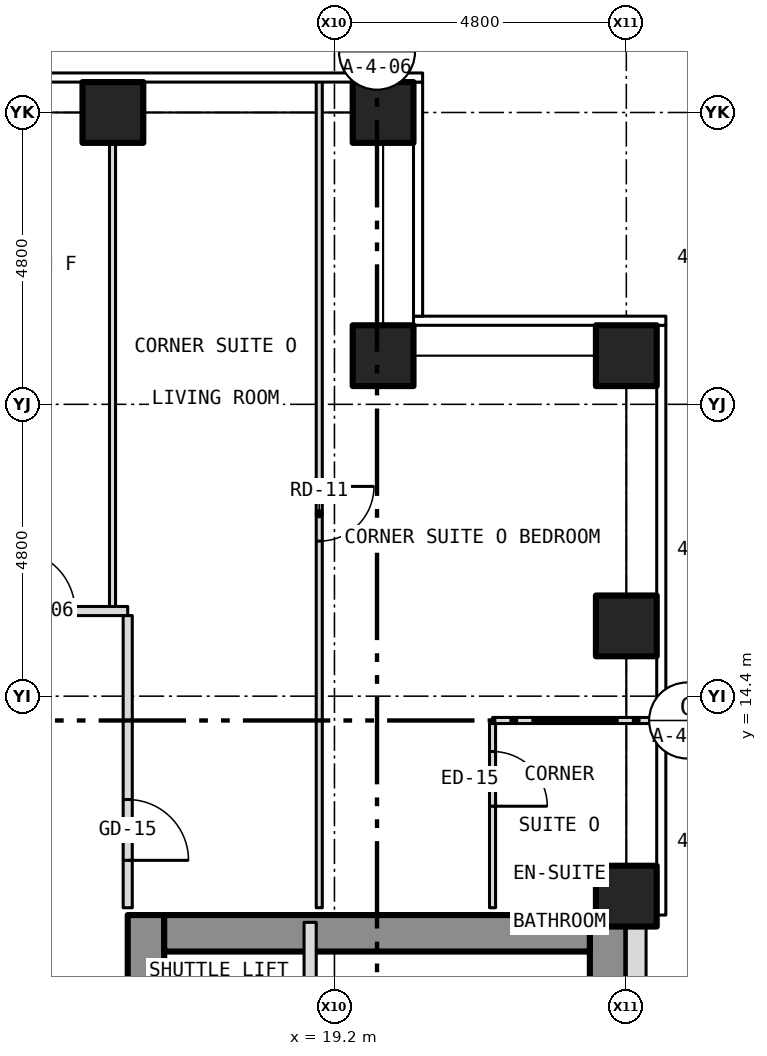
"""IFC4 building model, lengths in metres.
Left out: names, types, materials, properties, quantities, classifications, styles, units other than length and angle.
Written with IfcOpenShell. Run it as: python <this file> out.ifc"""

import sys

from ifc_helpers import new_model, si_unit, direction, frame, frame_2d, origin, origin_2d, place, context, subcontext, project, spatial, rectangle, hollow_rectangle, extrude, element, fill, save


model = new_model("IFC4")
c1 = context("Model", 3, precision=1e-05, world=origin(), true_north=direction((0.0, 1.0)))
c2 = subcontext(c1, "Body", "Model", "MODEL_VIEW")
j1 = project(units=[si_unit("LENGTHUNIT", "METRE"), si_unit("PLANEANGLEUNIT", "RADIAN")], contexts=[c1])
p1 = place(None, origin())
s1 = spatial("IfcSite", under=j1, at=p1, CompositionType="ELEMENT")
p2 = place(p1, origin())
s2 = spatial("IfcBuilding", under=s1, at=p2, CompositionType="ELEMENT")
p3 = place(p2, frame((0.0, 0.0, 53.0)))
s3 = spatial("IfcBuildingStorey", under=s2, at=p3, CompositionType="ELEMENT", Elevation=53.0)
for number, where, z_axis, x_axis in (
    (1, (15.556, 24.0, -0.15), (0.0, 0.0, 1.0), (1.0, 0.0, 0.0)),
    (2, (20.0, 24.0, -0.15), (0.0, 0.0, 1.0), (1.0, 0.0, 0.0)),
    (3, (24.0, 11.111, -0.15), (0.0, 0.0, 1.0), (1.0, 0.0, 0.0)),
    (4, (24.0, 15.556, -0.15), (0.0, 0.0, 1.0), (1.0, 0.0, 0.0)),
    (5, (24.0, 20.0, -0.15), (0.0, 0.0, 1.0), (1.0, 0.0, 0.0)),
    (6, (20.0, 20.0, -0.15), (0.0, 0.0, 1.0), (1.0, 0.0, 0.0)),
):
    element("IfcColumn", number, at=place(p3, frame(where, z_axis=z_axis, x_axis=x_axis)), inside=s3, PredefinedType="COLUMN", context=c2, shape_type="SweptSolid", body=[
        extrude(hollow_rectangle(XDim=1.0, YDim=1.0, WallThickness=0.06, at=origin_2d()), origin(), (0.0, 0.0, 1.0), 3.5),
    ])
p4 = place(p3, frame((16.1, -10.8, 0.0), z_axis=(0.0, 0.0, 1.0), x_axis=(0.0, 1.0, 0.0)))
e7 = element("IfcWall", 7, at=p4, inside=s3, PredefinedType="SHEAR", context=c2, shape_type="SweptSolid", body=[
    extrude(rectangle(XDim=21.6, YDim=0.6, at=frame_2d((10.8, 0.0))), origin(), (0.0, 0.0, 1.0), 3.25),
])
p5 = place(p4, frame((9.4, 0.0, 0.0)))
e8 = element("IfcOpeningElement", 8, at=p5, cuts=e7, PredefinedType="OPENING", context=c2, shape_type="SweptSolid", body=[
    extrude(rectangle(XDim=1.1, YDim=2.1, at=frame_2d((0.55, 1.05))), frame((0.0, 0.312, 0.0), z_axis=(0.0, -1.0, 0.0), x_axis=(1.0, 0.0, 0.0)), (0.0, 0.0, 1.0), 0.624),
])
p6 = place(p4, frame((11.5, 0.0, 0.0)))
e9 = element("IfcOpeningElement", 9, at=p6, cuts=e7, PredefinedType="OPENING", context=c2, shape_type="SweptSolid", body=[
    extrude(rectangle(XDim=1.1, YDim=2.1, at=frame_2d((0.55, 1.05))), frame((0.0, 0.312, 0.0), z_axis=(0.0, -1.0, 0.0), x_axis=(1.0, 0.0, 0.0)), (0.0, 0.0, 1.0), 0.624),
])
p7 = place(p4, frame((13.6, 0.0, 0.0)))
e10 = element("IfcOpeningElement", 10, at=p7, cuts=e7, PredefinedType="OPENING", context=c2, shape_type="SweptSolid", body=[
    extrude(rectangle(XDim=1.1, YDim=2.1, at=frame_2d((0.55, 1.05))), frame((0.0, 0.312, 0.0), z_axis=(0.0, -1.0, 0.0), x_axis=(1.0, 0.0, 0.0)), (0.0, 0.0, 1.0), 0.624),
])
p8 = place(p4, frame((15.7, 0.0, 0.0)))
e11 = element("IfcOpeningElement", 11, at=p8, cuts=e7, PredefinedType="OPENING", context=c2, shape_type="SweptSolid", body=[
    extrude(rectangle(XDim=1.1, YDim=2.1, at=frame_2d((0.55, 1.05))), frame((0.0, 0.312, 0.0), z_axis=(0.0, -1.0, 0.0), x_axis=(1.0, 0.0, 0.0)), (0.0, 0.0, 1.0), 0.624),
])
p9 = place(p4, frame((17.8, 0.0, 0.0)))
e12 = element("IfcOpeningElement", 12, at=p9, cuts=e7, PredefinedType="OPENING", context=c2, shape_type="SweptSolid", body=[
    extrude(rectangle(XDim=1.1, YDim=2.1, at=frame_2d((0.55, 1.05))), frame((0.0, 0.312, 0.0), z_axis=(0.0, -1.0, 0.0), x_axis=(1.0, 0.0, 0.0)), (0.0, 0.0, 1.0), 0.624),
])
p10 = place(p4, frame((5.642, 0.0, 0.0)))
e13 = element("IfcOpeningElement", 13, at=p10, cuts=e7, PredefinedType="OPENING", context=c2, shape_type="SweptSolid", body=[
    extrude(rectangle(XDim=1.1, YDim=2.1, at=frame_2d((0.55, 1.05))), frame((0.0, 0.312, 0.0), z_axis=(0.0, -1.0, 0.0), x_axis=(1.0, 0.0, 0.0)), (0.0, 0.0, 1.0), 0.624),
])
p11 = place(p4, frame((7.5, 0.0, 0.0)))
e14 = element("IfcOpeningElement", 14, at=p11, cuts=e7, PredefinedType="OPENING", context=c2, shape_type="SweptSolid", body=[
    extrude(rectangle(XDim=1.1, YDim=2.1, at=frame_2d((0.55, 1.05))), frame((0.0, 0.312, 0.0), z_axis=(0.0, -1.0, 0.0), x_axis=(1.0, 0.0, 0.0)), (0.0, 0.0, 1.0), 0.624),
])
p12 = place(p3, frame((23.7, -10.8, 0.0), z_axis=(0.0, 0.0, 1.0), x_axis=(0.0, 1.0, 0.0)))
e15 = element("IfcWall", 15, at=p12, inside=s3, PredefinedType="SHEAR", context=c2, shape_type="SweptSolid", body=[
    extrude(rectangle(XDim=21.6, YDim=0.6, at=frame_2d((10.8, 0.0))), origin(), (0.0, 0.0, 1.0), 3.25),
])
p13 = place(p3, frame((16.4, 10.5, 0.0), z_axis=(0.0, 0.0, 1.0), x_axis=(1.0, 0.0, 0.0)))
e16 = element("IfcWall", 16, at=p13, inside=s3, PredefinedType="SHEAR", context=c2, shape_type="SweptSolid", body=[
    extrude(rectangle(XDim=7.0, YDim=0.6, at=frame_2d((3.5, 0.0))), origin(), (0.0, 0.0, 1.0), 3.25),
])
p14 = place(p3, frame((24.163, -10.8, 0.0), z_axis=(0.0, 0.0, 1.0), x_axis=(0.0, 1.0, 0.0)))
e17 = element("IfcWall", 17, at=p14, inside=s3, PredefinedType="SOLIDWALL", context=c2, shape_type="SweptSolid", body=[
    extrude(rectangle(XDim=21.6, YDim=0.325, at=frame_2d((10.8, 0.0))), origin(), (0.0, 0.0, 1.0), 3.5),
])
p15 = place(p14, frame((2.95, 0.0, 1.0)))
e18 = element("IfcOpeningElement", 18, at=p15, cuts=e17, PredefinedType="OPENING", context=c2, shape_type="SweptSolid", body=[
    extrude(rectangle(XDim=0.6, YDim=1.5, at=frame_2d((0.3, 0.75))), frame((0.0, 0.175, 0.0), z_axis=(0.0, -1.0, 0.0), x_axis=(1.0, 0.0, 0.0)), (0.0, 0.0, 1.0), 0.349),
])
p16 = place(p3, frame((21.8, 14.0, 0.0), z_axis=(0.0, 0.0, 1.0), x_axis=(1.0, 0.0, 0.0)))
e19 = element("IfcWall", 19, at=p16, inside=s3, PredefinedType="PARTITIONING", context=c2, shape_type="SweptSolid", body=[
    extrude(rectangle(XDim=2.73, YDim=0.1, at=frame_2d((1.365, 0.0))), origin(), (0.0, 0.0, 1.0), 3.35),
])
p17 = place(p3, frame((-15.8, 15.8, 0.0), z_axis=(0.0, 0.0, 1.0), x_axis=(1.0, 0.0, 0.0)))
e20 = element("IfcWall", 20, at=p17, inside=s3, PredefinedType="PARTITIONING", context=c2, shape_type="SweptSolid", body=[
    extrude(rectangle(XDim=31.6, YDim=0.15, at=frame_2d((15.8, 0.0))), origin(), (0.0, 0.0, 1.0), 3.35),
])
p18 = place(p17, frame((4.178, 0.0, 0.0)))
e21 = element("IfcOpeningElement", 21, at=p18, cuts=e20, PredefinedType="OPENING", context=c2, shape_type="SweptSolid", body=[
    extrude(rectangle(XDim=1.0, YDim=2.1, at=frame_2d((0.5, 1.05))), frame((0.0, 0.087, 0.0), z_axis=(0.0, -1.0, 0.0), x_axis=(1.0, 0.0, 0.0)), (0.0, 0.0, 1.0), 0.174),
])
p19 = place(p17, frame((9.734, 0.0, 0.0)))
e22 = element("IfcOpeningElement", 22, at=p19, cuts=e20, PredefinedType="OPENING", context=c2, shape_type="SweptSolid", body=[
    extrude(rectangle(XDim=1.0, YDim=2.1, at=frame_2d((0.5, 1.05))), frame((0.0, 0.087, 0.0), z_axis=(0.0, -1.0, 0.0), x_axis=(1.0, 0.0, 0.0)), (0.0, 0.0, 1.0), 0.174),
])
p20 = place(p17, frame((14.178, 0.0, 0.0)))
e23 = element("IfcOpeningElement", 23, at=p20, cuts=e20, PredefinedType="OPENING", context=c2, shape_type="SweptSolid", body=[
    extrude(rectangle(XDim=1.0, YDim=2.1, at=frame_2d((0.5, 1.05))), frame((0.0, 0.087, 0.0), z_axis=(0.0, -1.0, 0.0), x_axis=(1.0, 0.0, 0.0)), (0.0, 0.0, 1.0), 0.174),
])
p21 = place(p17, frame((17.534, 0.0, 0.0)))
e24 = element("IfcOpeningElement", 24, at=p21, cuts=e20, PredefinedType="OPENING", context=c2, shape_type="SweptSolid", body=[
    extrude(rectangle(XDim=1.0, YDim=2.1, at=frame_2d((0.5, 1.05))), frame((0.0, 0.087, 0.0), z_axis=(0.0, -1.0, 0.0), x_axis=(1.0, 0.0, 0.0)), (0.0, 0.0, 1.0), 0.174),
])
p22 = place(p17, frame((25.289, 0.0, 0.0)))
e25 = element("IfcOpeningElement", 25, at=p22, cuts=e20, PredefinedType="OPENING", context=c2, shape_type="SweptSolid", body=[
    extrude(rectangle(XDim=1.0, YDim=2.1, at=frame_2d((0.5, 1.05))), frame((0.0, 0.087, 0.0), z_axis=(0.0, -1.0, 0.0), x_axis=(1.0, 0.0, 0.0)), (0.0, 0.0, 1.0), 0.174),
])
p23 = place(p17, frame((29.733, 0.0, 0.0)))
e26 = element("IfcOpeningElement", 26, at=p23, cuts=e20, PredefinedType="OPENING", context=c2, shape_type="SweptSolid", body=[
    extrude(rectangle(XDim=1.0, YDim=2.1, at=frame_2d((0.5, 1.05))), frame((0.0, 0.087, 0.0), z_axis=(0.0, -1.0, 0.0), x_axis=(1.0, 0.0, 0.0)), (0.0, 0.0, 1.0), 0.174),
])
p24 = place(p3, frame((15.55, 15.875, 0.0), z_axis=(0.0, 0.0, 1.0), x_axis=(0.0, 1.0, 0.0)))
e27 = element("IfcWall", 27, at=p24, inside=s3, PredefinedType="PARTITIONING", context=c2, shape_type="SweptSolid", body=[
    extrude(rectangle(XDim=8.005, YDim=0.1, at=frame_2d((4.002, 0.0))), origin(), (0.0, 0.0, 1.0), 3.35),
])
p25 = place(p3, frame((15.8, 10.92, 0.0), z_axis=(0.0, 0.0, 1.0), x_axis=(0.0, 1.0, 0.0)))
e28 = element("IfcWall", 28, at=p25, inside=s3, PredefinedType="PARTITIONING", context=c2, shape_type="SweptSolid", body=[
    extrude(rectangle(XDim=4.805, YDim=0.15, at=frame_2d((2.403, 0.0))), origin(), (0.0, 0.0, 1.0), 3.35),
])
p26 = place(p25, frame((0.78, 0.0, 0.0)))
e29 = element("IfcOpeningElement", 29, at=p26, cuts=e28, PredefinedType="OPENING", context=c2, shape_type="SweptSolid", body=[
    extrude(rectangle(XDim=1.0, YDim=2.1, at=frame_2d((0.5, 1.05))), frame((0.0, 0.087, 0.0), z_axis=(0.0, -1.0, 0.0), x_axis=(1.0, 0.0, 0.0)), (0.0, 0.0, 1.0), 0.174),
])
p27 = place(p3, frame((18.8, 4.45, 0.0), z_axis=(0.0, 0.0, 1.0), x_axis=(0.0, 1.0, 0.0)))
e30 = element("IfcWall", 30, at=p27, inside=s3, PredefinedType="PARTITIONING", context=c2, shape_type="SweptSolid", body=[
    extrude(rectangle(XDim=6.23, YDim=0.2, at=frame_2d((3.115, 0.0))), origin(), (0.0, 0.0, 1.0), 3.25),
])
p28 = place(p3, frame((18.95, 10.92, 0.0), z_axis=(0.0, 0.0, 1.0), x_axis=(0.0, 1.0, 0.0)))
e31 = element("IfcWall", 31, at=p28, inside=s3, PredefinedType="PARTITIONING", context=c2, shape_type="SweptSolid", body=[
    extrude(rectangle(XDim=13.61, YDim=0.1, at=frame_2d((6.805, 0.0))), origin(), (0.0, 0.0, 1.0), 3.35),
])
p29 = place(p28, frame((6.03, 0.0, 0.0)))
e32 = element("IfcOpeningElement", 32, at=p29, cuts=e31, PredefinedType="OPENING", context=c2, shape_type="SweptSolid", body=[
    extrude(rectangle(XDim=0.9, YDim=2.1, at=frame_2d((0.45, 1.05))), frame((0.0, 0.062, 0.0), z_axis=(0.0, -1.0, 0.0), x_axis=(1.0, 0.0, 0.0)), (0.0, 0.0, 1.0), 0.124),
])
p30 = place(p3, frame((21.8, 10.92, 0.0), z_axis=(0.0, 0.0, 1.0), x_axis=(0.0, 1.0, 0.0)))
e33 = element("IfcWall", 33, at=p30, inside=s3, PredefinedType="PARTITIONING", context=c2, shape_type="SweptSolid", body=[
    extrude(rectangle(XDim=3.03, YDim=0.1, at=frame_2d((1.515, 0.0))), origin(), (0.0, 0.0, 1.0), 3.35),
])
p31 = place(p30, frame((1.67, 0.0, 0.0)))
e34 = element("IfcOpeningElement", 34, at=p31, cuts=e33, PredefinedType="OPENING", context=c2, shape_type="SweptSolid", body=[
    extrude(rectangle(XDim=0.9, YDim=2.1, at=frame_2d((0.45, 1.05))), frame((0.0, 0.062, 0.0), z_axis=(0.0, -1.0, 0.0), x_axis=(1.0, 0.0, 0.0)), (0.0, 0.0, 1.0), 0.124),
])
p32 = place(p23, origin())
e35 = element("IfcDoor", 35, at=p32, inside=s3, OperationType="SINGLE_SWING_LEFT", PredefinedType="DOOR", context=c2, shape_type="SweptSolid", body=[
    extrude(rectangle(XDim=1.0, YDim=2.1, at=frame_2d((0.5, 1.05))), frame((0.0, 0.025, 0.0), z_axis=(0.0, -1.0, 0.0), x_axis=(1.0, 0.0, 0.0)), (0.0, 0.0, 1.0), 0.05),
])
fill(e26, e35)
p33 = place(p26, origin())
e36 = element("IfcDoor", 36, at=p33, inside=s3, OperationType="SINGLE_SWING_LEFT", PredefinedType="DOOR", context=c2, shape_type="SweptSolid", body=[
    extrude(rectangle(XDim=1.0, YDim=2.1, at=frame_2d((0.5, 1.05))), frame((0.0, 0.025, 0.0), z_axis=(0.0, -1.0, 0.0), x_axis=(1.0, 0.0, 0.0)), (0.0, 0.0, 1.0), 0.05),
])
fill(e29, e36)
p34 = place(p29, origin())
e37 = element("IfcDoor", 37, at=p34, inside=s3, OperationType="SINGLE_SWING_RIGHT", PredefinedType="DOOR", context=c2, shape_type="SweptSolid", body=[
    extrude(rectangle(XDim=0.9, YDim=2.1, at=frame_2d((0.45, 1.05))), frame((0.0, 0.025, 0.0), z_axis=(0.0, -1.0, 0.0), x_axis=(1.0, 0.0, 0.0)), (0.0, 0.0, 1.0), 0.05),
])
fill(e32, e37)
p35 = place(p31, origin())
e38 = element("IfcDoor", 38, at=p35, inside=s3, OperationType="SINGLE_SWING_LEFT", PredefinedType="DOOR", context=c2, shape_type="SweptSolid", body=[
    extrude(rectangle(XDim=0.9, YDim=2.1, at=frame_2d((0.45, 1.05))), frame((0.0, 0.025, 0.0), z_axis=(0.0, -1.0, 0.0), x_axis=(1.0, 0.0, 0.0)), (0.0, 0.0, 1.0), 0.05),
])
fill(e34, e38)
save(model, sys.argv[1])
